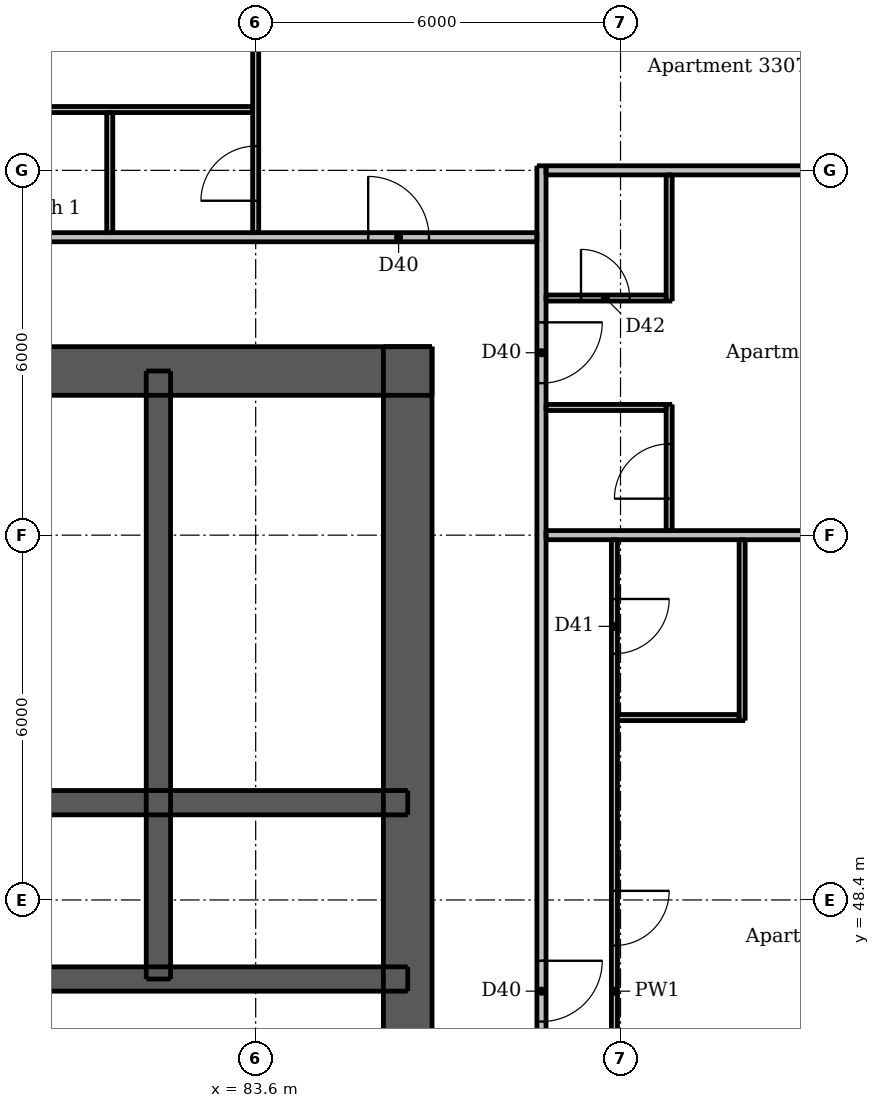
"""IFC4 building model, lengths in metres.
Left out: names, types, materials, properties, quantities, classifications, styles, units other than length and angle.
Written with IfcOpenShell. Run it as: python <this file> out.ifc"""

import sys

from ifc_helpers import new_model, si_unit, direction, frame, frame_2d, origin, place, context, subcontext, project, spatial, rectangle, extrude, element, fill, save


model = new_model("IFC4")
c1 = context("Model", 3, precision=1e-05, world=origin(), true_north=direction((0.0, 1.0)))
c2 = subcontext(c1, "Body", "Model", "MODEL_VIEW")
j1 = project(units=[si_unit("LENGTHUNIT", "METRE"), si_unit("PLANEANGLEUNIT", "RADIAN")], contexts=[c1])
p1 = place(None, origin())
s1 = spatial("IfcSite", under=j1, at=p1, CompositionType="ELEMENT")
p2 = place(p1, origin())
s2 = spatial("IfcBuilding", under=s1, at=p2, CompositionType="ELEMENT")
p3 = place(p2, frame((0.0, 0.0, 121.6)))
s3 = spatial("IfcBuildingStorey", under=s2, at=p3, CompositionType="ELEMENT", Elevation=121.6)
p4 = place(p3, frame((62.5, 57.1, 0.0), z_axis=(0.0, 0.0, 1.0), x_axis=(1.0, 0.0, 0.0)))
e1 = element("IfcWall", 1, at=p4, inside=s3, PredefinedType="SHEAR", context=c2, shape_type="SweptSolid", body=[
    extrude(rectangle(XDim=24.0, YDim=0.8, at=frame_2d((12.0, 0.0))), origin(), (0.0, 0.0, 1.0), 2.95),
])
p5 = place(p4, frame((20.9, 0.0, 0.0)))
e2 = element("IfcOpeningElement", 2, at=p5, cuts=e1, PredefinedType="OPENING", context=c2, shape_type="SweptSolid", body=[
    extrude(rectangle(XDim=1.1, YDim=2.1, at=frame_2d((0.55, 1.05))), frame((0.0, 0.41, 0.0), z_axis=(0.0, -1.0, 0.0), x_axis=(1.0, 0.0, 0.0)), (0.0, 0.0, 1.0), 0.82),
])
p6 = place(p4, frame((2.0, 0.0, 0.0)))
e3 = element("IfcOpeningElement", 3, at=p6, cuts=e1, PredefinedType="OPENING", context=c2, shape_type="SweptSolid", body=[
    extrude(rectangle(XDim=1.1, YDim=2.1, at=frame_2d((0.55, 1.05))), frame((0.0, 0.41, 0.0), z_axis=(0.0, -1.0, 0.0), x_axis=(1.0, 0.0, 0.0)), (0.0, 0.0, 1.0), 0.82),
])
p7 = place(p4, frame((6.075, 0.0, 0.0)))
e4 = element("IfcOpeningElement", 4, at=p7, cuts=e1, PredefinedType="OPENING", context=c2, shape_type="SweptSolid", body=[
    extrude(rectangle(XDim=0.9, YDim=2.1, at=frame_2d((0.45, 1.05))), frame((0.0, 0.41, 0.0), z_axis=(0.0, -1.0, 0.0), x_axis=(1.0, 0.0, 0.0)), (0.0, 0.0, 1.0), 0.82),
])
p8 = place(p4, frame((10.455, 0.0, 0.0)))
e5 = element("IfcOpeningElement", 5, at=p8, cuts=e1, PredefinedType="OPENING", context=c2, shape_type="SweptSolid", body=[
    extrude(rectangle(XDim=0.9, YDim=2.1, at=frame_2d((0.45, 1.05))), frame((0.0, 0.41, 0.0), z_axis=(0.0, -1.0, 0.0), x_axis=(1.0, 0.0, 0.0)), (0.0, 0.0, 1.0), 0.82),
])
p9 = place(p4, frame((15.93, 0.0, 0.0)))
e6 = element("IfcOpeningElement", 6, at=p9, cuts=e1, PredefinedType="OPENING", context=c2, shape_type="SweptSolid", body=[
    extrude(rectangle(XDim=0.9, YDim=2.1, at=frame_2d((0.45, 1.05))), frame((0.0, 0.41, 0.0), z_axis=(0.0, -1.0, 0.0), x_axis=(1.0, 0.0, 0.0)), (0.0, 0.0, 1.0), 0.82),
])
p10 = place(p3, frame((86.1, 33.5, 0.0), z_axis=(0.0, 0.0, 1.0), x_axis=(0.0, 1.0, 0.0)))
e7 = element("IfcWall", 7, at=p10, inside=s3, PredefinedType="SHEAR", context=c2, shape_type="SweptSolid", body=[
    extrude(rectangle(XDim=24.0, YDim=0.8, at=frame_2d((12.0, 0.0))), origin(), (0.0, 0.0, 1.0), 2.95),
])
p11 = place(p10, frame((11.2, 0.0, 0.0)))
e8 = element("IfcOpeningElement", 8, at=p11, cuts=e7, PredefinedType="OPENING", context=c2, shape_type="SweptSolid", body=[
    extrude(rectangle(XDim=1.6, YDim=2.1, at=frame_2d((0.8, 1.05))), frame((0.0, 0.41, 0.0), z_axis=(0.0, -1.0, 0.0), x_axis=(1.0, 0.0, 0.0)), (0.0, 0.0, 1.0), 0.82),
])
p12 = place(p3, frame((62.9, 47.1, 0.0), z_axis=(0.0, 0.0, 1.0), x_axis=(1.0, 0.0, 0.0)))
e9 = element("IfcWall", 9, at=p12, inside=s3, PredefinedType="SHEAR", context=c2, shape_type="SweptSolid", body=[
    extrude(rectangle(XDim=23.2, YDim=0.4, at=frame_2d((11.6, 0.0))), origin(), (0.0, 0.0, 1.0), 2.95),
])
p13 = place(p12, frame((0.825, 0.0, 0.0)))
e10 = element("IfcOpeningElement", 10, at=p13, cuts=e9, PredefinedType="OPENING", context=c2, shape_type="SweptSolid", body=[
    extrude(rectangle(XDim=0.9, YDim=2.1, at=frame_2d((0.45, 1.05))), frame((0.0, 0.21, 0.0), z_axis=(0.0, -1.0, 0.0), x_axis=(1.0, 0.0, 0.0)), (0.0, 0.0, 1.0), 0.42),
])
p14 = place(p12, frame((2.575, 0.0, 0.0)))
e11 = element("IfcOpeningElement", 11, at=p14, cuts=e9, PredefinedType="OPENING", context=c2, shape_type="SweptSolid", body=[
    extrude(rectangle(XDim=0.9, YDim=2.1, at=frame_2d((0.45, 1.05))), frame((0.0, 0.21, 0.0), z_axis=(0.0, -1.0, 0.0), x_axis=(1.0, 0.0, 0.0)), (0.0, 0.0, 1.0), 0.42),
])
p15 = place(p12, frame((20.6, 0.0, 0.0)))
e12 = element("IfcOpeningElement", 12, at=p15, cuts=e9, PredefinedType="OPENING", context=c2, shape_type="SweptSolid", body=[
    extrude(rectangle(XDim=0.9, YDim=2.1, at=frame_2d((0.45, 1.05))), frame((0.0, 0.21, 0.0), z_axis=(0.0, -1.0, 0.0), x_axis=(1.0, 0.0, 0.0)), (0.0, 0.0, 1.0), 0.42),
])
p16 = place(p3, frame((62.9, 50.0, 0.0), z_axis=(0.0, 0.0, 1.0), x_axis=(1.0, 0.0, 0.0)))
e13 = element("IfcWall", 13, at=p16, inside=s3, PredefinedType="SHEAR", context=c2, shape_type="SweptSolid", body=[
    extrude(rectangle(XDim=23.2, YDim=0.4, at=frame_2d((11.6, 0.0))), origin(), (0.0, 0.0, 1.0), 2.95),
])
p17 = place(p3, frame((82.0, 47.1, 0.0), z_axis=(0.0, 0.0, 1.0), x_axis=(0.0, 1.0, 0.0)))
e14 = element("IfcWall", 14, at=p17, inside=s3, PredefinedType="SHEAR", context=c2, shape_type="SweptSolid", body=[
    extrude(rectangle(XDim=10.0, YDim=0.4, at=frame_2d((5.0, 0.0))), origin(), (0.0, 0.0, 1.0), 2.95),
])
p18 = place(p3, frame((81.2, 59.375, 0.0), z_axis=(0.0, 0.0, 1.0), x_axis=(0.0, 1.0, 0.0)))
e15 = element("IfcWall", 15, at=p18, inside=s3, PredefinedType="PARTITIONING", context=c2, shape_type="SweptSolid", body=[
    extrude(rectangle(XDim=1.975, YDim=0.1, at=frame_2d((0.988, 0.0))), origin(), (0.0, 0.0, 1.0), 2.95),
])
p19 = place(p3, frame((83.6, 59.375, 0.0), z_axis=(0.0, 0.0, 1.0), x_axis=(0.0, 1.0, 0.0)))
e16 = element("IfcWall", 16, at=p19, inside=s3, PredefinedType="PARTITIONING", context=c2, shape_type="SweptSolid", body=[
    extrude(rectangle(XDim=8.625, YDim=0.1, at=frame_2d((4.312, 0.0))), origin(), (0.0, 0.0, 1.0), 2.332),
])
p20 = place(p19, frame((0.525, 0.0, 0.0)))
e17 = element("IfcOpeningElement", 17, at=p20, cuts=e16, PredefinedType="OPENING", context=c2, shape_type="SweptSolid", body=[
    extrude(rectangle(XDim=0.9, YDim=2.1, at=frame_2d((0.45, 1.05))), frame((0.0, 0.06, 0.0), z_axis=(0.0, -1.0, 0.0), x_axis=(1.0, 0.0, 0.0)), (0.0, 0.0, 1.0), 0.12),
])
p21 = place(p19, frame((4.875, 0.0, 0.0)))
e18 = element("IfcOpeningElement", 18, at=p21, cuts=e16, PredefinedType="OPENING", context=c2, shape_type="SweptSolid", body=[
    extrude(rectangle(XDim=0.9, YDim=2.1, at=frame_2d((0.45, 1.05))), frame((0.0, 0.06, 0.0), z_axis=(0.0, -1.0, 0.0), x_axis=(1.0, 0.0, 0.0)), (0.0, 0.0, 1.0), 0.12),
])
p22 = place(p3, frame((89.5, 54.325, 0.0), z_axis=(0.0, 0.0, 1.0), x_axis=(0.0, -1.0, 0.0)))
e19 = element("IfcWall", 19, at=p22, inside=s3, PredefinedType="PARTITIONING", context=c2, shape_type="SweptSolid", body=[
    extrude(rectangle(XDim=14.85, YDim=0.1, at=frame_2d((7.425, 0.0))), origin(), (0.0, 0.0, 1.0), 2.95),
])
p23 = place(p22, frame((5.775, 0.0, 0.0)))
e20 = element("IfcOpeningElement", 20, at=p23, cuts=e19, PredefinedType="OPENING", context=c2, shape_type="SweptSolid", body=[
    extrude(rectangle(XDim=0.9, YDim=2.1, at=frame_2d((0.45, 1.05))), frame((0.0, 0.06, 0.0), z_axis=(0.0, -1.0, 0.0), x_axis=(1.0, 0.0, 0.0)), (0.0, 0.0, 1.0), 0.12),
])
p24 = place(p22, frame((0.975, 0.0, 0.0)))
e21 = element("IfcOpeningElement", 21, at=p24, cuts=e19, PredefinedType="OPENING", context=c2, shape_type="SweptSolid", body=[
    extrude(rectangle(XDim=0.9, YDim=2.1, at=frame_2d((0.45, 1.05))), frame((0.0, 0.06, 0.0), z_axis=(0.0, -1.0, 0.0), x_axis=(1.0, 0.0, 0.0)), (0.0, 0.0, 1.0), 0.12),
])
p25 = place(p22, frame((12.975, 0.0, 0.0)))
e22 = element("IfcOpeningElement", 22, at=p25, cuts=e19, PredefinedType="OPENING", context=c2, shape_type="SweptSolid", body=[
    extrude(rectangle(XDim=0.9, YDim=2.1, at=frame_2d((0.45, 1.05))), frame((0.0, 0.06, 0.0), z_axis=(0.0, -1.0, 0.0), x_axis=(1.0, 0.0, 0.0)), (0.0, 0.0, 1.0), 0.12),
])
p26 = place(p22, frame((10.325, 0.0, 0.0)))
e23 = element("IfcOpeningElement", 23, at=p26, cuts=e19, PredefinedType="OPENING", context=c2, shape_type="SweptSolid", body=[
    extrude(rectangle(XDim=0.8, YDim=2.1, at=frame_2d((0.4, 1.05))), frame((0.0, 0.06, 0.0), z_axis=(0.0, -1.0, 0.0), x_axis=(1.0, 0.0, 0.0)), (0.0, 0.0, 1.0), 0.12),
])
p27 = place(p3, frame((90.4, 54.475, 0.0), z_axis=(0.0, 0.0, 1.0), x_axis=(0.0, 1.0, 0.0)))
e24 = element("IfcWall", 24, at=p27, inside=s3, PredefinedType="PARTITIONING", context=c2, shape_type="SweptSolid", body=[
    extrude(rectangle(XDim=2.075, YDim=0.1, at=frame_2d((1.038, 0.0))), origin(), (0.0, 0.0, 1.0), 2.95),
])
p28 = place(p27, frame((0.525, 0.0, 0.0)))
e25 = element("IfcOpeningElement", 25, at=p28, cuts=e24, PredefinedType="OPENING", context=c2, shape_type="SweptSolid", body=[
    extrude(rectangle(XDim=0.9, YDim=2.1, at=frame_2d((0.45, 1.05))), frame((0.0, 0.06, 0.0), z_axis=(0.0, -1.0, 0.0), x_axis=(1.0, 0.0, 0.0)), (0.0, 0.0, 1.0), 0.12),
])
p29 = place(p3, frame((90.4, 58.25, 0.0), z_axis=(0.0, 0.0, 1.0), x_axis=(0.0, 1.0, 0.0)))
e26 = element("IfcWall", 26, at=p29, inside=s3, PredefinedType="PARTITIONING", context=c2, shape_type="SweptSolid", body=[
    extrude(rectangle(XDim=2.075, YDim=0.1, at=frame_2d((1.038, 0.0))), origin(), (0.0, 0.0, 1.0), 2.95),
])
p30 = place(p3, frame((91.6, 51.35, 0.0), z_axis=(0.0, 0.0, 1.0), x_axis=(0.0, 1.0, 0.0)))
e27 = element("IfcWall", 27, at=p30, inside=s3, PredefinedType="PARTITIONING", context=c2, shape_type="SweptSolid", body=[
    extrude(rectangle(XDim=2.975, YDim=0.1, at=frame_2d((1.487, 0.0))), origin(), (0.0, 0.0, 1.0), 2.95),
])
p31 = place(p3, frame((83.55, 61.4, 0.0), z_axis=(0.0, 0.0, 1.0), x_axis=(-1.0, 0.0, 0.0)))
e28 = element("IfcWall", 28, at=p31, inside=s3, PredefinedType="PARTITIONING", context=c2, shape_type="SweptSolid", body=[
    extrude(rectangle(XDim=5.875, YDim=0.1, at=frame_2d((2.938, 0.0))), origin(), (0.0, 0.0, 1.0), 2.95),
])
p32 = place(p31, frame((3.75, 0.0, 0.0)))
e29 = element("IfcOpeningElement", 29, at=p32, cuts=e28, PredefinedType="OPENING", context=c2, shape_type="SweptSolid", body=[
    extrude(rectangle(XDim=0.8, YDim=2.1, at=frame_2d((0.4, 1.05))), frame((0.0, 0.06, 0.0), z_axis=(0.0, -1.0, 0.0), x_axis=(1.0, 0.0, 0.0)), (0.0, 0.0, 1.0), 0.12),
])
p33 = place(p3, frame((88.375, 58.3, 0.0), z_axis=(0.0, 0.0, 1.0), x_axis=(1.0, 0.0, 0.0)))
e30 = element("IfcWall", 30, at=p33, inside=s3, PredefinedType="PARTITIONING", context=c2, shape_type="SweptSolid", body=[
    extrude(rectangle(XDim=1.975, YDim=0.1, at=frame_2d((0.988, 0.0))), origin(), (0.0, 0.0, 1.0), 2.95),
])
p34 = place(p33, frame((0.575, 0.0, 0.0)))
e31 = element("IfcOpeningElement", 31, at=p34, cuts=e30, PredefinedType="OPENING", context=c2, shape_type="SweptSolid", body=[
    extrude(rectangle(XDim=0.8, YDim=2.1, at=frame_2d((0.4, 1.05))), frame((0.0, 0.06, 0.0), z_axis=(0.0, -1.0, 0.0), x_axis=(1.0, 0.0, 0.0)), (0.0, 0.0, 1.0), 0.12),
])
p35 = place(p3, frame((88.375, 56.5, 0.0), z_axis=(0.0, 0.0, 1.0), x_axis=(1.0, 0.0, 0.0)))
e32 = element("IfcWall", 32, at=p35, inside=s3, PredefinedType="PARTITIONING", context=c2, shape_type="SweptSolid", body=[
    extrude(rectangle(XDim=1.975, YDim=0.1, at=frame_2d((0.988, 0.0))), origin(), (0.0, 0.0, 1.0), 2.95),
])
p36 = place(p3, frame((89.55, 51.4, 0.0), z_axis=(0.0, 0.0, 1.0), x_axis=(1.0, 0.0, 0.0)))
e33 = element("IfcWall", 33, at=p36, inside=s3, PredefinedType="PARTITIONING", context=c2, shape_type="SweptSolid", body=[
    extrude(rectangle(XDim=2.0, YDim=0.1, at=frame_2d((1.0, 0.0))), origin(), (0.0, 0.0, 1.0), 2.95),
])
p37 = place(p3, frame((88.3, 60.475, 0.0), z_axis=(0.0, 0.0, 1.0), x_axis=(0.0, -1.0, 0.0)))
e34 = element("IfcWall", 34, at=p37, inside=s3, PredefinedType="PARTITIONING", context=c2, shape_type="SweptSolid", body=[
    extrude(rectangle(XDim=28.7, YDim=0.15, at=frame_2d((14.35, 0.0))), origin(), (0.0, 0.0, 1.0), 2.95),
])
p38 = place(p37, frame((27.425, 0.0, 0.0)))
e35 = element("IfcOpeningElement", 35, at=p38, cuts=e34, PredefinedType="OPENING", context=c2, shape_type="SweptSolid", body=[
    extrude(rectangle(XDim=1.0, YDim=2.1, at=frame_2d((0.5, 1.05))), frame((0.0, 0.085, 0.0), z_axis=(0.0, -1.0, 0.0), x_axis=(1.0, 0.0, 0.0)), (0.0, 0.0, 1.0), 0.17),
])
p39 = place(p37, frame((13.075, 0.0, 0.0)))
e36 = element("IfcOpeningElement", 36, at=p39, cuts=e34, PredefinedType="OPENING", context=c2, shape_type="SweptSolid", body=[
    extrude(rectangle(XDim=1.0, YDim=2.1, at=frame_2d((0.5, 1.05))), frame((0.0, 0.085, 0.0), z_axis=(0.0, -1.0, 0.0), x_axis=(1.0, 0.0, 0.0)), (0.0, 0.0, 1.0), 0.17),
])
p40 = place(p37, frame((2.575, 0.0, 0.0)))
e37 = element("IfcOpeningElement", 37, at=p40, cuts=e34, PredefinedType="OPENING", context=c2, shape_type="SweptSolid", body=[
    extrude(rectangle(XDim=1.0, YDim=2.1, at=frame_2d((0.5, 1.05))), frame((0.0, 0.085, 0.0), z_axis=(0.0, -1.0, 0.0), x_axis=(1.0, 0.0, 0.0)), (0.0, 0.0, 1.0), 0.17),
])
p41 = place(p3, frame((88.375, 60.4, 0.0), z_axis=(0.0, 0.0, 1.0), x_axis=(1.0, 0.0, 0.0)))
e38 = element("IfcWall", 38, at=p41, inside=s3, PredefinedType="PARTITIONING", context=c2, shape_type="SweptSolid", body=[
    extrude(rectangle(XDim=11.625, YDim=0.15, at=frame_2d((5.812, 0.0))), origin(), (0.0, 0.0, 1.0), 2.332),
])
p42 = place(p3, frame((59.675, 59.3, 0.0), z_axis=(0.0, 0.0, 1.0), x_axis=(1.0, 0.0, 0.0)))
e39 = element("IfcWall", 39, at=p42, inside=s3, PredefinedType="PARTITIONING", context=c2, shape_type="SweptSolid", body=[
    extrude(rectangle(XDim=28.55, YDim=0.15, at=frame_2d((14.275, 0.0))), origin(), (0.0, 0.0, 1.0), 2.95),
])
p43 = place(p42, frame((8.975, 0.0, 0.0)))
e40 = element("IfcOpeningElement", 40, at=p43, cuts=e39, PredefinedType="OPENING", context=c2, shape_type="SweptSolid", body=[
    extrude(rectangle(XDim=1.0, YDim=2.1, at=frame_2d((0.5, 1.05))), frame((0.0, 0.085, 0.0), z_axis=(0.0, -1.0, 0.0), x_axis=(1.0, 0.0, 0.0)), (0.0, 0.0, 1.0), 0.17),
])
p44 = place(p42, frame((25.775, 0.0, 0.0)))
e41 = element("IfcOpeningElement", 41, at=p44, cuts=e39, PredefinedType="OPENING", context=c2, shape_type="SweptSolid", body=[
    extrude(rectangle(XDim=1.0, YDim=2.1, at=frame_2d((0.5, 1.05))), frame((0.0, 0.085, 0.0), z_axis=(0.0, -1.0, 0.0), x_axis=(1.0, 0.0, 0.0)), (0.0, 0.0, 1.0), 0.17),
])
p45 = place(p3, frame((88.375, 54.4, 0.0), z_axis=(0.0, 0.0, 1.0), x_axis=(1.0, 0.0, 0.0)))
e42 = element("IfcWall", 42, at=p45, inside=s3, PredefinedType="PARTITIONING", context=c2, shape_type="SweptSolid", body=[
    extrude(rectangle(XDim=10.125, YDim=0.15, at=frame_2d((5.062, 0.0))), origin(), (0.0, 0.0, 1.0), 2.332),
])
p46 = place(p5, origin())
e43 = element("IfcDoor", 43, at=p46, inside=s3, OperationType="SINGLE_SWING_RIGHT", PredefinedType="DOOR", context=c2, shape_type="SweptSolid", body=[
    extrude(rectangle(XDim=1.1, YDim=2.1, at=frame_2d((0.55, 1.05))), frame((0.0, -0.337, 0.0), z_axis=(0.0, -1.0, 0.0), x_axis=(1.0, 0.0, 0.0)), (0.0, 0.0, 1.0), 0.05),
])
fill(e2, e43)
p47 = place(p15, origin())
e44 = element("IfcDoor", 44, at=p47, inside=s3, OperationType="SINGLE_SWING_LEFT", PredefinedType="DOOR", context=c2, shape_type="SweptSolid", body=[
    extrude(rectangle(XDim=0.9, YDim=2.1, at=frame_2d((0.45, 1.05))), frame((0.0, 0.188, 0.0), z_axis=(0.0, -1.0, 0.0), x_axis=(1.0, 0.0, 0.0)), (0.0, 0.0, 1.0), 0.05),
])
fill(e12, e44)
p48 = place(p39, origin())
e45 = element("IfcDoor", 45, at=p48, inside=s3, OperationType="SINGLE_SWING_LEFT", PredefinedType="DOOR", context=c2, shape_type="SweptSolid", body=[
    extrude(rectangle(XDim=1.0, YDim=2.1, at=frame_2d((0.5, 1.05))), frame((0.0, 0.025, 0.0), z_axis=(0.0, -1.0, 0.0), x_axis=(1.0, 0.0, 0.0)), (0.0, 0.0, 1.0), 0.05),
])
fill(e36, e45)
p49 = place(p23, origin())
e46 = element("IfcDoor", 46, at=p49, inside=s3, OperationType="SINGLE_SWING_LEFT", PredefinedType="DOOR", context=c2, shape_type="SweptSolid", body=[
    extrude(rectangle(XDim=0.9, YDim=2.1, at=frame_2d((0.45, 1.05))), frame((0.0, 0.025, 0.0), z_axis=(0.0, -1.0, 0.0), x_axis=(1.0, 0.0, 0.0)), (0.0, 0.0, 1.0), 0.05),
])
fill(e20, e46)
p50 = place(p24, origin())
e47 = element("IfcDoor", 47, at=p50, inside=s3, OperationType="SINGLE_SWING_LEFT", PredefinedType="DOOR", context=c2, shape_type="SweptSolid", body=[
    extrude(rectangle(XDim=0.9, YDim=2.1, at=frame_2d((0.45, 1.05))), frame((0.0, 0.025, 0.0), z_axis=(0.0, -1.0, 0.0), x_axis=(1.0, 0.0, 0.0)), (0.0, 0.0, 1.0), 0.05),
])
fill(e21, e47)
p51 = place(p40, origin())
e48 = element("IfcDoor", 48, at=p51, inside=s3, OperationType="SINGLE_SWING_LEFT", PredefinedType="DOOR", context=c2, shape_type="SweptSolid", body=[
    extrude(rectangle(XDim=1.0, YDim=2.1, at=frame_2d((0.5, 1.05))), frame((0.0, 0.025, 0.0), z_axis=(0.0, -1.0, 0.0), x_axis=(1.0, 0.0, 0.0)), (0.0, 0.0, 1.0), 0.05),
])
fill(e37, e48)
p52 = place(p28, origin())
e49 = element("IfcDoor", 49, at=p52, inside=s3, OperationType="SINGLE_SWING_LEFT", PredefinedType="DOOR", context=c2, shape_type="SweptSolid", body=[
    extrude(rectangle(XDim=0.9, YDim=2.1, at=frame_2d((0.45, 1.05))), frame((0.0, 0.025, 0.0), z_axis=(0.0, -1.0, 0.0), x_axis=(1.0, 0.0, 0.0)), (0.0, 0.0, 1.0), 0.05),
])
fill(e25, e49)
p53 = place(p34, origin())
e50 = element("IfcDoor", 50, at=p53, inside=s3, OperationType="SINGLE_SWING_LEFT", PredefinedType="DOOR", context=c2, shape_type="SweptSolid", body=[
    extrude(rectangle(XDim=0.8, YDim=2.1, at=frame_2d((0.4, 1.05))), frame((0.0, 0.025, 0.0), z_axis=(0.0, -1.0, 0.0), x_axis=(1.0, 0.0, 0.0)), (0.0, 0.0, 1.0), 0.05),
])
fill(e31, e50)
p54 = place(p44, origin())
e51 = element("IfcDoor", 51, at=p54, inside=s3, OperationType="SINGLE_SWING_LEFT", PredefinedType="DOOR", context=c2, shape_type="SweptSolid", body=[
    extrude(rectangle(XDim=1.0, YDim=2.1, at=frame_2d((0.5, 1.05))), frame((0.0, 0.025, 0.0), z_axis=(0.0, -1.0, 0.0), x_axis=(1.0, 0.0, 0.0)), (0.0, 0.0, 1.0), 0.05),
])
fill(e41, e51)
p55 = place(p20, origin())
e52 = element("IfcDoor", 52, at=p55, inside=s3, OperationType="SINGLE_SWING_LEFT", PredefinedType="DOOR", context=c2, shape_type="SweptSolid", body=[
    extrude(rectangle(XDim=0.9, YDim=2.1, at=frame_2d((0.45, 1.05))), frame((0.0, 0.025, 0.0), z_axis=(0.0, -1.0, 0.0), x_axis=(1.0, 0.0, 0.0)), (0.0, 0.0, 1.0), 0.05),
])
fill(e17, e52)
save(model, sys.argv[1])
